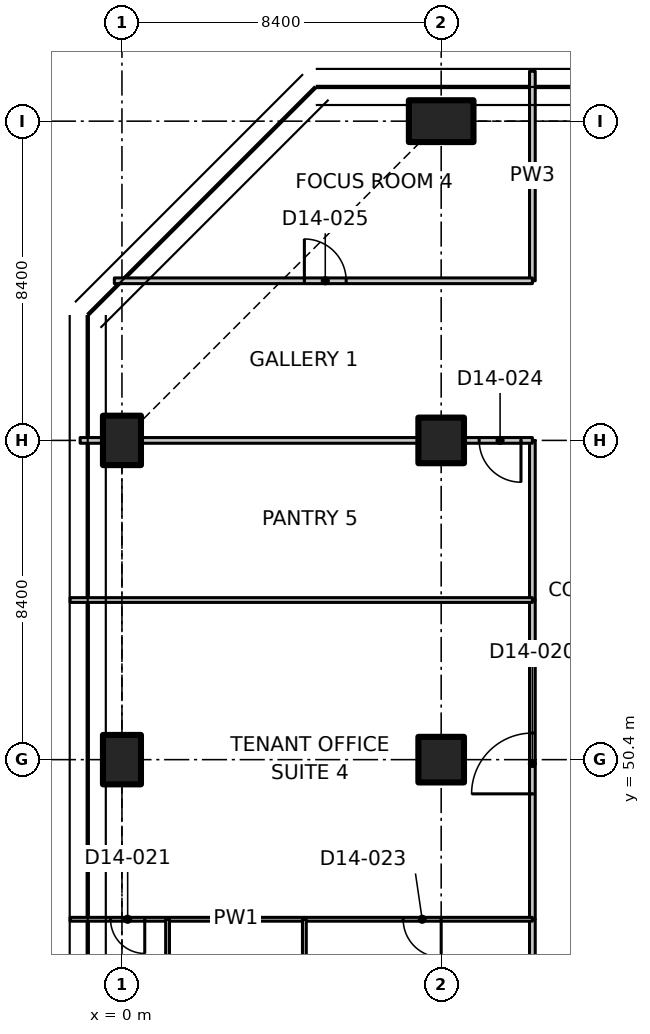
"""IFC4 building model, lengths in metres.
Left out: names, types, materials, properties, quantities, classifications, styles, units other than length and angle.
Written with IfcOpenShell. Run it as: python <this file> out.ifc"""

import sys

from ifc_helpers import new_model, si_unit, direction, frame, frame_2d, origin, origin_2d, place, context, subcontext, project, spatial, polyline, rectangle, outline, extrude, element, fill, save


model = new_model("IFC4")
c1 = context("Model", 3, precision=1e-05, world=origin(), true_north=direction((0.0, 1.0)))
c2 = subcontext(c1, "Body", "Model", "MODEL_VIEW")
j1 = project(units=[si_unit("LENGTHUNIT", "METRE"), si_unit("PLANEANGLEUNIT", "RADIAN")], contexts=[c1])
p1 = place(None, origin())
s1 = spatial("IfcSite", under=j1, at=p1, CompositionType="ELEMENT")
p2 = place(p1, origin())
s2 = spatial("IfcBuilding", under=s1, at=p2, CompositionType="ELEMENT")
p3 = place(p2, frame((0.0, 0.0, 106.1)))
s3 = spatial("IfcBuildingStorey", under=s2, at=p3, CompositionType="ELEMENT", Elevation=106.1)
for number, where, z_axis, x_axis in (
    (1, (0.0, 50.4, 0.0), (0.0, 0.0, 1.0), (1.0, 0.0, 0.0)),
    (2, (0.0, 58.8, 0.0), (0.0, 0.0, 1.0), (1.0, 0.0, 0.0)),
):
    element("IfcColumn", number, at=place(p3, frame(where, z_axis=z_axis, x_axis=x_axis)), inside=s3, PredefinedType="COLUMN", context=c2, shape_type="SweptSolid", body=[
        extrude(rectangle(XDim=1.0, YDim=1.3, at=origin_2d()), origin(), (0.0, 0.0, 1.0), 3.35),
    ])
for number, where, z_axis, x_axis in (
    (3, (8.4, 50.4, 0.0), (0.0, 0.0, 1.0), (1.0, 0.0, 0.0)),
    (4, (8.4, 58.8, 0.0), (0.0, 0.0, 1.0), (1.0, 0.0, 0.0)),
):
    element("IfcColumn", number, at=place(p3, frame(where, z_axis=z_axis, x_axis=x_axis)), inside=s3, PredefinedType="COLUMN", context=c2, shape_type="SweptSolid", body=[
        extrude(rectangle(XDim=1.2, YDim=1.2, at=origin_2d()), origin(), (0.0, 0.0, 1.0), 3.35),
    ])
p4 = place(p3, frame((8.4, 67.2, 0.0), z_axis=(0.0, 0.0, 1.0), x_axis=(0.0, 1.0, 0.0)))
e5 = element("IfcColumn", 5, at=p4, inside=s3, PredefinedType="COLUMN", context=c2, shape_type="SweptSolid", body=[
    extrude(rectangle(XDim=1.1, YDim=1.7, at=origin_2d()), origin(), (0.0, 0.0, 1.0), 3.35),
])
p5 = place(p3, frame((10.8, 46.2, 0.0), z_axis=(0.0, 0.0, 1.0), x_axis=(0.0, 1.0, 0.0)))
e6 = element("IfcWall", 6, at=p5, inside=s3, PredefinedType="PARTITIONING", context=c2, shape_type="SweptSolid", body=[
    extrude(rectangle(XDim=8.4, YDim=0.15, at=frame_2d((4.2, 0.0))), origin(), (0.0, 0.0, 1.0), 3.33),
])
p6 = place(p5, frame((3.3, 0.0, 0.0)))
e7 = element("IfcOpeningElement", 7, at=p6, cuts=e6, PredefinedType="OPENING", context=c2, shape_type="SweptSolid", body=[
    extrude(rectangle(XDim=1.6, YDim=2.1, at=frame_2d((0.8, 1.05))), frame((0.0, 0.085, 0.0), z_axis=(0.0, -1.0, 0.0), x_axis=(1.0, 0.0, 0.0)), (0.0, 0.0, 1.0), 0.17),
])
for number, where, z_axis, x_axis in (
    (8, (10.8, 42.0, 0.0), (0.0, 0.0, 1.0), (0.0, 1.0, 0.0)),
    (9, (10.8, 54.6, 0.0), (0.0, 0.0, 1.0), (0.0, 1.0, 0.0)),
):
    element("IfcWall", number, at=place(p3, frame(where, z_axis=z_axis, x_axis=x_axis)), inside=s3, PredefinedType="PARTITIONING", context=c2, shape_type="SweptSolid", body=[
        extrude(rectangle(XDim=4.2, YDim=0.15, at=frame_2d((2.1, 0.0))), origin(), (0.0, 0.0, 1.0), 3.33),
    ])
p7 = place(p3, frame((10.8, 63.0, 0.0), z_axis=(0.0, 0.0, 1.0), x_axis=(0.0, 1.0, 0.0)))
e10 = element("IfcWall", 10, at=p7, inside=s3, PredefinedType="PARTITIONING", context=c2, shape_type="SweptSolid", body=[
    extrude(outline(polyline([(0.0, 0.0), (5.514, 0.0), (5.514, 3.33), (5.28, 3.33), (4.65, 3.33), (4.648, 2.98), (3.752, 2.98), (3.75, 3.33), (0.0, 3.33), (0.0, 0.0)])), frame((0.0, 0.075, 0.0), z_axis=(0.0, -1.0, 0.0), x_axis=(1.0, 0.0, 0.0)), (0.0, 0.0, 1.0), 0.15),
])
p8 = place(p3, frame((10.8, 58.8, 0.0), z_axis=(0.0, 0.0, 1.0), x_axis=(-1.0, 0.0, 0.0)))
e11 = element("IfcWall", 11, at=p8, inside=s3, PredefinedType="PARTITIONING", context=c2, shape_type="SweptSolid", body=[
    extrude(rectangle(XDim=1.78, YDim=0.15, at=frame_2d((0.89, 0.0))), origin(), (0.0, 0.0, 1.0), 3.33),
])
p9 = place(p8, frame((0.3, 0.0, 0.0)))
e12 = element("IfcOpeningElement", 12, at=p9, cuts=e11, PredefinedType="OPENING", context=c2, shape_type="SweptSolid", body=[
    extrude(rectangle(XDim=1.1, YDim=2.1, at=frame_2d((0.55, 1.05))), frame((0.0, 0.085, 0.0), z_axis=(0.0, -1.0, 0.0), x_axis=(1.0, 0.0, 0.0)), (0.0, 0.0, 1.0), 0.17),
])
p10 = place(p3, frame((7.78, 58.8, 0.0), z_axis=(0.0, 0.0, 1.0), x_axis=(-1.0, 0.0, 0.0)))
e13 = element("IfcWall", 13, at=p10, inside=s3, PredefinedType="PARTITIONING", context=c2, shape_type="SweptSolid", body=[
    extrude(outline(polyline([(0.0, 0.0), (7.26, 0.0), (7.26, 2.98), (7.091, 2.98), (7.089, 3.33), (0.0, 3.33), (0.0, 0.0)])), frame((0.0, 0.075, 0.0), z_axis=(0.0, -1.0, 0.0), x_axis=(1.0, 0.0, 0.0)), (0.0, 0.0, 1.0), 0.15),
])
p11 = place(p3, frame((-0.52, 58.8, 0.0), z_axis=(0.0, 0.0, 1.0), x_axis=(-1.0, 0.0, 0.0)))
e14 = element("IfcWall", 14, at=p11, inside=s3, PredefinedType="PARTITIONING", context=c2, shape_type="SweptSolid", body=[
    extrude(rectangle(XDim=0.58, YDim=0.15, at=frame_2d((0.29, 0.0))), origin(), (0.0, 0.0, 1.0), 3.33),
])
p12 = place(p3, frame((-0.2, 63.0, 0.0), z_axis=(0.0, 0.0, 1.0), x_axis=(1.0, 0.0, 0.0)))
e15 = element("IfcWall", 15, at=p12, inside=s3, PredefinedType="PARTITIONING", context=c2, shape_type="SweptSolid", body=[
    extrude(outline(polyline([(0.0, 0.0), (11.0, 0.0), (11.0, 3.33), (5.091, 3.33), (5.089, 2.98), (3.711, 2.98), (3.709, 3.33), (0.0, 3.33), (0.0, 0.0)])), frame((0.0, 0.075, 0.0), z_axis=(0.0, -1.0, 0.0), x_axis=(1.0, 0.0, 0.0)), (0.0, 0.0, 1.0), 0.15),
])
p13 = place(p12, frame((5.0, 0.0, 0.0)))
e16 = element("IfcOpeningElement", 16, at=p13, cuts=e15, PredefinedType="OPENING", context=c2, shape_type="SweptSolid", body=[
    extrude(rectangle(XDim=1.1, YDim=2.1, at=frame_2d((0.55, 1.05))), frame((0.0, 0.085, 0.0), z_axis=(0.0, -1.0, 0.0), x_axis=(1.0, 0.0, 0.0)), (0.0, 0.0, 1.0), 0.17),
])
p14 = place(p3, frame((1.2, 46.2, 0.0), z_axis=(0.0, 0.0, 1.0), x_axis=(-1.0, 0.0, 0.0)))
e17 = element("IfcWall", 17, at=p14, inside=s3, PredefinedType="PARTITIONING", context=c2, shape_type="SweptSolid", body=[
    extrude(rectangle(XDim=2.565, YDim=0.1, at=frame_2d((1.282, 0.0))), origin(), (0.0, 0.0, 1.0), 2.98),
])
p15 = place(p14, frame((0.6, 0.0, 0.0)))
e18 = element("IfcOpeningElement", 18, at=p15, cuts=e17, PredefinedType="OPENING", context=c2, shape_type="SweptSolid", body=[
    extrude(rectangle(XDim=0.9, YDim=2.1, at=frame_2d((0.45, 1.05))), frame((0.0, 0.06, 0.0), z_axis=(0.0, -1.0, 0.0), x_axis=(1.0, 0.0, 0.0)), (0.0, 0.0, 1.0), 0.12),
])
p16 = place(p3, frame((4.8, 46.2, 0.0), z_axis=(0.0, 0.0, 1.0), x_axis=(-1.0, 0.0, 0.0)))
e19 = element("IfcWall", 19, at=p16, inside=s3, PredefinedType="PARTITIONING", context=c2, shape_type="SweptSolid", body=[
    extrude(rectangle(XDim=3.6, YDim=0.1, at=frame_2d((1.8, 0.0))), origin(), (0.0, 0.0, 1.0), 3.33),
])
p17 = place(p3, frame((10.8, 46.2, 0.0), z_axis=(0.0, 0.0, 1.0), x_axis=(-1.0, 0.0, 0.0)))
e20 = element("IfcWall", 20, at=p17, inside=s3, PredefinedType="PARTITIONING", context=c2, shape_type="SweptSolid", body=[
    extrude(rectangle(XDim=6.0, YDim=0.1, at=frame_2d((3.0, 0.0))), origin(), (0.0, 0.0, 1.0), 3.33),
])
p18 = place(p17, frame((2.4, 0.0, 0.0)))
e21 = element("IfcOpeningElement", 21, at=p18, cuts=e20, PredefinedType="OPENING", context=c2, shape_type="SweptSolid", body=[
    extrude(rectangle(XDim=1.0, YDim=2.1, at=frame_2d((0.5, 1.05))), frame((0.0, 0.06, 0.0), z_axis=(0.0, -1.0, 0.0), x_axis=(1.0, 0.0, 0.0)), (0.0, 0.0, 1.0), 0.12),
])
p19 = place(p3, frame((-1.365, 54.6, 0.0), z_axis=(0.0, 0.0, 1.0), x_axis=(1.0, 0.0, 0.0)))
e22 = element("IfcWall", 22, at=p19, inside=s3, PredefinedType="PARTITIONING", context=c2, shape_type="SweptSolid", body=[
    extrude(outline(polyline([(0.0, 0.0), (12.165, 0.0), (12.165, 3.33), (1.815, 3.33), (1.813, 2.98), (0.917, 2.98), (0.915, 3.33), (0.265, 3.33), (0.0, 3.33), (0.0, 0.0)])), frame((0.0, 0.062, 0.0), z_axis=(0.0, -1.0, 0.0), x_axis=(1.0, 0.0, 0.0)), (0.0, 0.0, 1.0), 0.125),
])
p20 = place(p3, frame((1.2, 46.2, 0.0), z_axis=(0.0, 0.0, 1.0), x_axis=(0.0, -1.0, 0.0)))
e23 = element("IfcWall", 23, at=p20, inside=s3, PredefinedType="PARTITIONING", context=c2, shape_type="SweptSolid", body=[
    extrude(rectangle(XDim=4.2, YDim=0.1, at=frame_2d((2.1, 0.0))), origin(), (0.0, 0.0, 1.0), 3.33),
])
p21 = place(p20, frame((1.8, 0.0, 0.0)))
e24 = element("IfcOpeningElement", 24, at=p21, cuts=e23, PredefinedType="OPENING", context=c2, shape_type="SweptSolid", body=[
    extrude(rectangle(XDim=0.9, YDim=2.1, at=frame_2d((0.45, 1.05))), frame((0.0, 0.06, 0.0), z_axis=(0.0, -1.0, 0.0), x_axis=(1.0, 0.0, 0.0)), (0.0, 0.0, 1.0), 0.12),
])
p22 = place(p3, frame((4.8, 46.2, 0.0), z_axis=(0.0, 0.0, 1.0), x_axis=(0.0, -1.0, 0.0)))
e25 = element("IfcWall", 25, at=p22, inside=s3, PredefinedType="PARTITIONING", context=c2, shape_type="SweptSolid", body=[
    extrude(rectangle(XDim=4.2, YDim=0.1, at=frame_2d((2.1, 0.0))), origin(), (0.0, 0.0, 1.0), 3.33),
])
p23 = place(p6, origin())
e26 = element("IfcDoor", 26, at=p23, inside=s3, OperationType="DOUBLE_DOOR_SINGLE_SWING", PredefinedType="DOOR", context=c2, shape_type="SweptSolid", body=[
    extrude(rectangle(XDim=1.6, YDim=2.1, at=frame_2d((0.8, 1.05))), frame((0.0, 0.025, 0.0), z_axis=(0.0, -1.0, 0.0), x_axis=(1.0, 0.0, 0.0)), (0.0, 0.0, 1.0), 0.05),
])
fill(e7, e26)
p24 = place(p15, origin())
e27 = element("IfcDoor", 27, at=p24, inside=s3, OperationType="SINGLE_SWING_LEFT", PredefinedType="DOOR", context=c2, shape_type="SweptSolid", body=[
    extrude(rectangle(XDim=0.9, YDim=2.1, at=frame_2d((0.45, 1.05))), frame((0.0, 0.025, 0.0), z_axis=(0.0, -1.0, 0.0), x_axis=(1.0, 0.0, 0.0)), (0.0, 0.0, 1.0), 0.05),
])
fill(e18, e27)
p25 = place(p18, origin())
e28 = element("IfcDoor", 28, at=p25, inside=s3, OperationType="SINGLE_SWING_LEFT", PredefinedType="DOOR", context=c2, shape_type="SweptSolid", body=[
    extrude(rectangle(XDim=1.0, YDim=2.1, at=frame_2d((0.5, 1.05))), frame((0.0, 0.025, 0.0), z_axis=(0.0, -1.0, 0.0), x_axis=(1.0, 0.0, 0.0)), (0.0, 0.0, 1.0), 0.05),
])
fill(e21, e28)
p26 = place(p9, origin())
e29 = element("IfcDoor", 29, at=p26, inside=s3, OperationType="SINGLE_SWING_LEFT", PredefinedType="DOOR", context=c2, shape_type="SweptSolid", body=[
    extrude(rectangle(XDim=1.1, YDim=2.1, at=frame_2d((0.55, 1.05))), frame((0.0, 0.025, 0.0), z_axis=(0.0, -1.0, 0.0), x_axis=(1.0, 0.0, 0.0)), (0.0, 0.0, 1.0), 0.05),
])
fill(e12, e29)
p27 = place(p13, origin())
e30 = element("IfcDoor", 30, at=p27, inside=s3, OperationType="SINGLE_SWING_LEFT", PredefinedType="DOOR", context=c2, shape_type="SweptSolid", body=[
    extrude(rectangle(XDim=1.1, YDim=2.1, at=frame_2d((0.55, 1.05))), frame((0.0, 0.025, 0.0), z_axis=(0.0, -1.0, 0.0), x_axis=(1.0, 0.0, 0.0)), (0.0, 0.0, 1.0), 0.05),
])
fill(e16, e30)
save(model, sys.argv[1])
